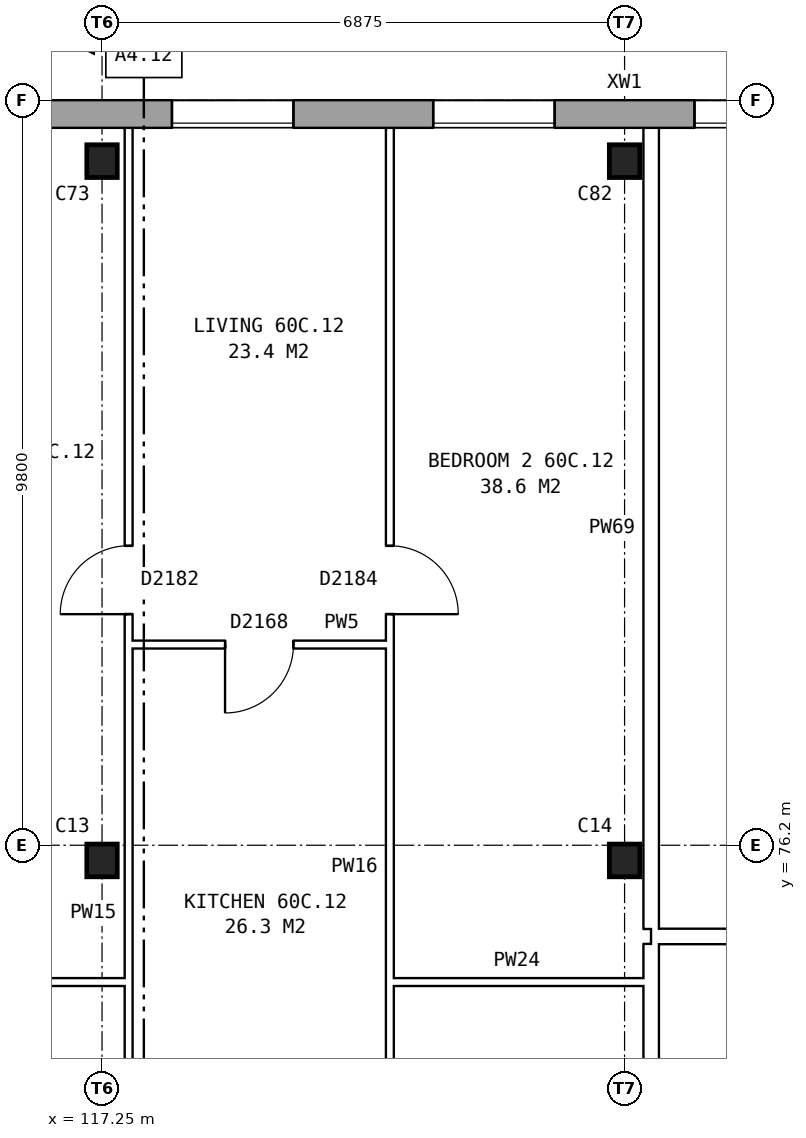
"""IFC4 building model, lengths in metres.
Left out: names, types, materials, properties, quantities, classifications, styles, units other than length and angle.
Written with IfcOpenShell. Run it as: python <this file> out.ifc"""

import sys

from ifc_helpers import new_model, si_unit, direction, frame, frame_2d, origin, origin_2d, place, context, subcontext, project, spatial, rectangle, i_section, extrude, element, fill, save


model = new_model("IFC4")
c1 = context("Model", 3, precision=1e-05, world=origin(), true_north=direction((0.0, 1.0)))
c2 = subcontext(c1, "Body", "Model", "MODEL_VIEW")
j1 = project(units=[si_unit("LENGTHUNIT", "METRE"), si_unit("PLANEANGLEUNIT", "RADIAN")], contexts=[c1])
p1 = place(None, origin())
s1 = spatial("IfcSite", under=j1, at=p1, CompositionType="ELEMENT")
p2 = place(p1, origin())
s2 = spatial("IfcBuilding", under=s1, at=p2, CompositionType="ELEMENT")
p3 = place(p2, frame((0.0, 0.0, 212.1)))
s3 = spatial("IfcBuildingStorey", under=s2, at=p3, CompositionType="ELEMENT", Elevation=212.1)
for number, where, z_axis, x_axis in (
    (1, (117.25, 76.0, 0.0), (0.0, 0.0, 1.0), (1.0, 0.0, 0.0)),
    (2, (124.125, 76.0, 0.0), (0.0, 0.0, 1.0), (1.0, 0.0, 0.0)),
    (3, (117.25, 85.2, 0.0), (0.0, 0.0, 1.0), (1.0, 0.0, 0.0)),
    (4, (124.125, 85.2, 0.0), (0.0, 0.0, 1.0), (1.0, 0.0, 0.0)),
):
    element("IfcColumn", number, at=place(p3, frame(where, z_axis=z_axis, x_axis=x_axis)), inside=s3, PredefinedType="COLUMN", context=c2, shape_type="SweptSolid", body=[
        extrude(i_section(OverallWidth=0.4, OverallDepth=0.43, WebThickness=0.04, FlangeThickness=0.04, at=origin_2d()), origin(), (0.0, 0.0, 1.0), 2.85),
    ])
p4 = place(p3, frame((131.05, 85.82, 0.0), z_axis=(0.0, 0.0, 1.0), x_axis=(-1.0, 0.0, 0.0)))
e5 = element("IfcWall", 5, at=p4, inside=s3, PredefinedType="STANDARD", context=c2, shape_type="SweptSolid", body=[
    extrude(rectangle(XDim=55.1, YDim=0.36, at=frame_2d((27.55, 0.0))), origin(), (0.0, 0.0, 1.0), 2.85),
])
p5 = place(p4, frame((0.969, 0.0, 0.8)))
e6 = element("IfcOpeningElement", 6, at=p5, cuts=e5, PredefinedType="OPENING", context=c2, shape_type="SweptSolid", body=[
    extrude(rectangle(XDim=1.6, YDim=1.8, at=frame_2d((0.8, 0.9))), frame((0.0, 0.19, 0.0), z_axis=(0.0, -1.0, 0.0), x_axis=(1.0, 0.0, 0.0)), (0.0, 0.0, 1.0), 0.38),
])
p6 = place(p4, frame((4.406, 0.0, 0.8)))
e7 = element("IfcOpeningElement", 7, at=p6, cuts=e5, PredefinedType="OPENING", context=c2, shape_type="SweptSolid", body=[
    extrude(rectangle(XDim=1.6, YDim=1.8, at=frame_2d((0.8, 0.9))), frame((0.0, 0.19, 0.0), z_axis=(0.0, -1.0, 0.0), x_axis=(1.0, 0.0, 0.0)), (0.0, 0.0, 1.0), 0.38),
])
p7 = place(p4, frame((7.844, 0.0, 0.8)))
e8 = element("IfcOpeningElement", 8, at=p7, cuts=e5, PredefinedType="OPENING", context=c2, shape_type="SweptSolid", body=[
    extrude(rectangle(XDim=1.6, YDim=1.8, at=frame_2d((0.8, 0.9))), frame((0.0, 0.19, 0.0), z_axis=(0.0, -1.0, 0.0), x_axis=(1.0, 0.0, 0.0)), (0.0, 0.0, 1.0), 0.38),
])
p8 = place(p4, frame((11.281, 0.0, 0.8)))
e9 = element("IfcOpeningElement", 9, at=p8, cuts=e5, PredefinedType="OPENING", context=c2, shape_type="SweptSolid", body=[
    extrude(rectangle(XDim=1.6, YDim=1.8, at=frame_2d((0.8, 0.9))), frame((0.0, 0.19, 0.0), z_axis=(0.0, -1.0, 0.0), x_axis=(1.0, 0.0, 0.0)), (0.0, 0.0, 1.0), 0.38),
])
p9 = place(p4, frame((14.719, 0.0, 0.8)))
e10 = element("IfcOpeningElement", 10, at=p9, cuts=e5, PredefinedType="OPENING", context=c2, shape_type="SweptSolid", body=[
    extrude(rectangle(XDim=1.6, YDim=1.8, at=frame_2d((0.8, 0.9))), frame((0.0, 0.19, 0.0), z_axis=(0.0, -1.0, 0.0), x_axis=(1.0, 0.0, 0.0)), (0.0, 0.0, 1.0), 0.38),
])
p10 = place(p4, frame((18.156, 0.0, 0.8)))
e11 = element("IfcOpeningElement", 11, at=p10, cuts=e5, PredefinedType="OPENING", context=c2, shape_type="SweptSolid", body=[
    extrude(rectangle(XDim=1.6, YDim=1.8, at=frame_2d((0.8, 0.9))), frame((0.0, 0.19, 0.0), z_axis=(0.0, -1.0, 0.0), x_axis=(1.0, 0.0, 0.0)), (0.0, 0.0, 1.0), 0.38),
])
p11 = place(p4, frame((21.594, 0.0, 0.8)))
e12 = element("IfcOpeningElement", 12, at=p11, cuts=e5, PredefinedType="OPENING", context=c2, shape_type="SweptSolid", body=[
    extrude(rectangle(XDim=1.6, YDim=1.8, at=frame_2d((0.8, 0.9))), frame((0.0, 0.19, 0.0), z_axis=(0.0, -1.0, 0.0), x_axis=(1.0, 0.0, 0.0)), (0.0, 0.0, 1.0), 0.38),
])
p12 = place(p4, frame((25.031, 0.0, 0.8)))
e13 = element("IfcOpeningElement", 13, at=p12, cuts=e5, PredefinedType="OPENING", context=c2, shape_type="SweptSolid", body=[
    extrude(rectangle(XDim=1.6, YDim=1.8, at=frame_2d((0.8, 0.9))), frame((0.0, 0.19, 0.0), z_axis=(0.0, -1.0, 0.0), x_axis=(1.0, 0.0, 0.0)), (0.0, 0.0, 1.0), 0.38),
])
p13 = place(p4, frame((28.469, 0.0, 0.8)))
e14 = element("IfcOpeningElement", 14, at=p13, cuts=e5, PredefinedType="OPENING", context=c2, shape_type="SweptSolid", body=[
    extrude(rectangle(XDim=1.6, YDim=1.8, at=frame_2d((0.8, 0.9))), frame((0.0, 0.19, 0.0), z_axis=(0.0, -1.0, 0.0), x_axis=(1.0, 0.0, 0.0)), (0.0, 0.0, 1.0), 0.38),
])
p14 = place(p4, frame((31.906, 0.0, 0.8)))
e15 = element("IfcOpeningElement", 15, at=p14, cuts=e5, PredefinedType="OPENING", context=c2, shape_type="SweptSolid", body=[
    extrude(rectangle(XDim=1.6, YDim=1.8, at=frame_2d((0.8, 0.9))), frame((0.0, 0.19, 0.0), z_axis=(0.0, -1.0, 0.0), x_axis=(1.0, 0.0, 0.0)), (0.0, 0.0, 1.0), 0.38),
])
p15 = place(p4, frame((35.344, 0.0, 0.8)))
e16 = element("IfcOpeningElement", 16, at=p15, cuts=e5, PredefinedType="OPENING", context=c2, shape_type="SweptSolid", body=[
    extrude(rectangle(XDim=1.6, YDim=1.8, at=frame_2d((0.8, 0.9))), frame((0.0, 0.19, 0.0), z_axis=(0.0, -1.0, 0.0), x_axis=(1.0, 0.0, 0.0)), (0.0, 0.0, 1.0), 0.38),
])
p16 = place(p4, frame((38.781, 0.0, 0.8)))
e17 = element("IfcOpeningElement", 17, at=p16, cuts=e5, PredefinedType="OPENING", context=c2, shape_type="SweptSolid", body=[
    extrude(rectangle(XDim=1.6, YDim=1.8, at=frame_2d((0.8, 0.9))), frame((0.0, 0.19, 0.0), z_axis=(0.0, -1.0, 0.0), x_axis=(1.0, 0.0, 0.0)), (0.0, 0.0, 1.0), 0.38),
])
p17 = place(p4, frame((42.219, 0.0, 0.8)))
e18 = element("IfcOpeningElement", 18, at=p17, cuts=e5, PredefinedType="OPENING", context=c2, shape_type="SweptSolid", body=[
    extrude(rectangle(XDim=1.6, YDim=1.8, at=frame_2d((0.8, 0.9))), frame((0.0, 0.19, 0.0), z_axis=(0.0, -1.0, 0.0), x_axis=(1.0, 0.0, 0.0)), (0.0, 0.0, 1.0), 0.38),
])
p18 = place(p4, frame((45.656, 0.0, 0.8)))
e19 = element("IfcOpeningElement", 19, at=p18, cuts=e5, PredefinedType="OPENING", context=c2, shape_type="SweptSolid", body=[
    extrude(rectangle(XDim=1.6, YDim=1.8, at=frame_2d((0.8, 0.9))), frame((0.0, 0.19, 0.0), z_axis=(0.0, -1.0, 0.0), x_axis=(1.0, 0.0, 0.0)), (0.0, 0.0, 1.0), 0.38),
])
p19 = place(p4, frame((49.094, 0.0, 0.8)))
e20 = element("IfcOpeningElement", 20, at=p19, cuts=e5, PredefinedType="OPENING", context=c2, shape_type="SweptSolid", body=[
    extrude(rectangle(XDim=1.6, YDim=1.8, at=frame_2d((0.8, 0.9))), frame((0.0, 0.19, 0.0), z_axis=(0.0, -1.0, 0.0), x_axis=(1.0, 0.0, 0.0)), (0.0, 0.0, 1.0), 0.38),
])
p20 = place(p4, frame((52.531, 0.0, 0.8)))
e21 = element("IfcOpeningElement", 21, at=p20, cuts=e5, PredefinedType="OPENING", context=c2, shape_type="SweptSolid", body=[
    extrude(rectangle(XDim=1.6, YDim=1.8, at=frame_2d((0.8, 0.9))), frame((0.0, 0.19, 0.0), z_axis=(0.0, -1.0, 0.0), x_axis=(1.0, 0.0, 0.0)), (0.0, 0.0, 1.0), 0.38),
])
p21 = place(p3, frame((110.725, 74.4, 0.0), z_axis=(0.0, 0.0, 1.0), x_axis=(1.0, 0.0, 0.0)))
e22 = element("IfcWall", 22, at=p21, inside=s3, PredefinedType="PARTITIONING", context=c2, shape_type="SweptSolid", body=[
    extrude(rectangle(XDim=6.875, YDim=0.1, at=frame_2d((3.438, 0.0))), origin(), (0.0, 0.0, 1.0), 2.85),
])
p22 = place(p3, frame((121.037, 74.4, 0.0), z_axis=(0.0, 0.0, 1.0), x_axis=(1.0, 0.0, 0.0)))
e23 = element("IfcWall", 23, at=p22, inside=s3, PredefinedType="PARTITIONING", context=c2, shape_type="SweptSolid", body=[
    extrude(rectangle(XDim=3.338, YDim=0.1, at=frame_2d((1.669, 0.0))), origin(), (0.0, 0.0, 1.0), 2.85),
])
p23 = place(p3, frame((124.475, 75.0, 0.0), z_axis=(0.0, 0.0, 1.0), x_axis=(1.0, 0.0, 0.0)))
e24 = element("IfcWall", 24, at=p23, inside=s3, PredefinedType="PARTITIONING", context=c2, shape_type="SweptSolid", body=[
    extrude(rectangle(XDim=6.885, YDim=0.2, at=frame_2d((3.442, 0.0))), origin(), (0.0, 0.0, 1.0), 2.85),
])
p24 = place(p23, frame((2.992, 0.0, 0.0)))
e25 = element("IfcOpeningElement", 25, at=p24, cuts=e24, PredefinedType="OPENING", context=c2, shape_type="SweptSolid", body=[
    extrude(rectangle(XDim=0.9, YDim=2.1, at=frame_2d((0.45, 1.05))), frame((0.0, 0.11, 0.0), z_axis=(0.0, -1.0, 0.0), x_axis=(1.0, 0.0, 0.0)), (0.0, 0.0, 1.0), 0.22),
])
p25 = place(p3, frame((117.6, 78.84, 0.0), z_axis=(0.0, 0.0, 1.0), x_axis=(1.0, 0.0, 0.0)))
e26 = element("IfcWall", 26, at=p25, inside=s3, PredefinedType="PARTITIONING", context=c2, shape_type="SweptSolid", body=[
    extrude(rectangle(XDim=3.437, YDim=0.1, at=frame_2d((1.719, 0.0))), origin(), (0.0, 0.0, 1.0), 2.85),
])
p26 = place(p25, frame((1.269, 0.0, 0.0)))
e27 = element("IfcOpeningElement", 27, at=p26, cuts=e26, PredefinedType="OPENING", context=c2, shape_type="SweptSolid", body=[
    extrude(rectangle(XDim=0.9, YDim=2.1, at=frame_2d((0.45, 1.05))), frame((0.0, 0.06, 0.0), z_axis=(0.0, -1.0, 0.0), x_axis=(1.0, 0.0, 0.0)), (0.0, 0.0, 1.0), 0.12),
])
p27 = place(p3, frame((117.6, 71.3, 0.0), z_axis=(0.0, 0.0, 1.0), x_axis=(0.0, 1.0, 0.0)))
e28 = element("IfcWall", 28, at=p27, inside=s3, PredefinedType="PARTITIONING", context=c2, shape_type="SweptSolid", body=[
    extrude(rectangle(XDim=14.34, YDim=0.1, at=frame_2d((7.17, 0.0))), origin(), (0.0, 0.0, 1.0), 2.85),
])
p28 = place(p27, frame((7.94, 0.0, 0.0)))
e29 = element("IfcOpeningElement", 29, at=p28, cuts=e28, PredefinedType="OPENING", context=c2, shape_type="SweptSolid", body=[
    extrude(rectangle(XDim=0.9, YDim=2.1, at=frame_2d((0.45, 1.05))), frame((0.0, 0.06, 0.0), z_axis=(0.0, -1.0, 0.0), x_axis=(1.0, 0.0, 0.0)), (0.0, 0.0, 1.0), 0.12),
])
p29 = place(p27, frame((0.4, 0.0, 0.0)))
e30 = element("IfcOpeningElement", 30, at=p29, cuts=e28, PredefinedType="OPENING", context=c2, shape_type="SweptSolid", body=[
    extrude(rectangle(XDim=0.9, YDim=2.1, at=frame_2d((0.45, 1.05))), frame((0.0, 0.06, 0.0), z_axis=(0.0, -1.0, 0.0), x_axis=(1.0, 0.0, 0.0)), (0.0, 0.0, 1.0), 0.12),
])
p30 = place(p3, frame((121.037, 71.3, 0.0), z_axis=(0.0, 0.0, 1.0), x_axis=(0.0, 1.0, 0.0)))
e31 = element("IfcWall", 31, at=p30, inside=s3, PredefinedType="PARTITIONING", context=c2, shape_type="SweptSolid", body=[
    extrude(rectangle(XDim=14.34, YDim=0.1, at=frame_2d((7.17, 0.0))), origin(), (0.0, 0.0, 1.0), 2.85),
])
p31 = place(p30, frame((7.94, 0.0, 0.0)))
e32 = element("IfcOpeningElement", 32, at=p31, cuts=e31, PredefinedType="OPENING", context=c2, shape_type="SweptSolid", body=[
    extrude(rectangle(XDim=0.9, YDim=2.1, at=frame_2d((0.45, 1.05))), frame((0.0, 0.06, 0.0), z_axis=(0.0, -1.0, 0.0), x_axis=(1.0, 0.0, 0.0)), (0.0, 0.0, 1.0), 0.12),
])
p32 = place(p30, frame((0.4, 0.0, 0.0)))
e33 = element("IfcOpeningElement", 33, at=p32, cuts=e31, PredefinedType="OPENING", context=c2, shape_type="SweptSolid", body=[
    extrude(rectangle(XDim=0.9, YDim=2.1, at=frame_2d((0.45, 1.05))), frame((0.0, 0.06, 0.0), z_axis=(0.0, -1.0, 0.0), x_axis=(1.0, 0.0, 0.0)), (0.0, 0.0, 1.0), 0.12),
])
p33 = place(p3, frame((124.475, 71.3, 0.0), z_axis=(0.0, 0.0, 1.0), x_axis=(0.0, 1.0, 0.0)))
e34 = element("IfcWall", 34, at=p33, inside=s3, PredefinedType="PARTITIONING", context=c2, shape_type="SweptSolid", body=[
    extrude(rectangle(XDim=3.6, YDim=0.2, at=frame_2d((1.8, 0.0))), origin(), (0.0, 0.0, 1.0), 2.85),
])
p34 = place(p3, frame((124.475, 75.1, 0.0), z_axis=(0.0, 0.0, 1.0), x_axis=(0.0, 1.0, 0.0)))
e35 = element("IfcWall", 35, at=p34, inside=s3, PredefinedType="PARTITIONING", context=c2, shape_type="SweptSolid", body=[
    extrude(rectangle(XDim=10.54, YDim=0.2, at=frame_2d((5.27, 0.0))), origin(), (0.0, 0.0, 1.0), 2.85),
])
p35 = place(p6, origin())
e36 = element("IfcWindow", 36, at=p35, inside=s3, PartitioningType="SINGLE_PANEL", PredefinedType="WINDOW", context=c2, shape_type="SweptSolid", body=[
    extrude(rectangle(XDim=1.6, YDim=1.8, at=frame_2d((0.8, 0.9))), frame((0.0, 0.15, 0.0), z_axis=(0.0, -1.0, 0.0), x_axis=(1.0, 0.0, 0.0)), (0.0, 0.0, 1.0), 0.06),
])
fill(e7, e36)
p36 = place(p7, origin())
e37 = element("IfcWindow", 37, at=p36, inside=s3, PartitioningType="SINGLE_PANEL", PredefinedType="WINDOW", context=c2, shape_type="SweptSolid", body=[
    extrude(rectangle(XDim=1.6, YDim=1.8, at=frame_2d((0.8, 0.9))), frame((0.0, 0.15, 0.0), z_axis=(0.0, -1.0, 0.0), x_axis=(1.0, 0.0, 0.0)), (0.0, 0.0, 1.0), 0.06),
])
fill(e8, e37)
p37 = place(p8, origin())
e38 = element("IfcWindow", 38, at=p37, inside=s3, PartitioningType="SINGLE_PANEL", PredefinedType="WINDOW", context=c2, shape_type="SweptSolid", body=[
    extrude(rectangle(XDim=1.6, YDim=1.8, at=frame_2d((0.8, 0.9))), frame((0.0, 0.15, 0.0), z_axis=(0.0, -1.0, 0.0), x_axis=(1.0, 0.0, 0.0)), (0.0, 0.0, 1.0), 0.06),
])
fill(e9, e38)
p38 = place(p28, origin())
e39 = element("IfcDoor", 39, at=p38, inside=s3, OperationType="SINGLE_SWING_LEFT", PredefinedType="DOOR", context=c2, shape_type="SweptSolid", body=[
    extrude(rectangle(XDim=0.9, YDim=2.1, at=frame_2d((0.45, 1.05))), frame((0.0, 0.025, 0.0), z_axis=(0.0, -1.0, 0.0), x_axis=(1.0, 0.0, 0.0)), (0.0, 0.0, 1.0), 0.05),
])
fill(e29, e39)
p39 = place(p31, frame((0.9, 0.0, 0.0), z_axis=(0.0, 0.0, 1.0), x_axis=(-1.0, 0.0, 0.0)))
e40 = element("IfcDoor", 40, at=p39, inside=s3, OperationType="SINGLE_SWING_RIGHT", PredefinedType="DOOR", context=c2, shape_type="SweptSolid", body=[
    extrude(rectangle(XDim=0.9, YDim=2.1, at=frame_2d((0.45, 1.05))), frame((0.0, 0.025, 0.0), z_axis=(0.0, -1.0, 0.0), x_axis=(1.0, 0.0, 0.0)), (0.0, 0.0, 1.0), 0.05),
])
fill(e32, e40)
p40 = place(p26, frame((0.9, 0.0, 0.0), z_axis=(0.0, 0.0, 1.0), x_axis=(-1.0, 0.0, 0.0)))
e41 = element("IfcDoor", 41, at=p40, inside=s3, OperationType="SINGLE_SWING_RIGHT", PredefinedType="DOOR", context=c2, shape_type="SweptSolid", body=[
    extrude(rectangle(XDim=0.9, YDim=2.1, at=frame_2d((0.45, 1.05))), frame((0.0, 0.025, 0.0), z_axis=(0.0, -1.0, 0.0), x_axis=(1.0, 0.0, 0.0)), (0.0, 0.0, 1.0), 0.05),
])
fill(e27, e41)
save(model, sys.argv[1])
